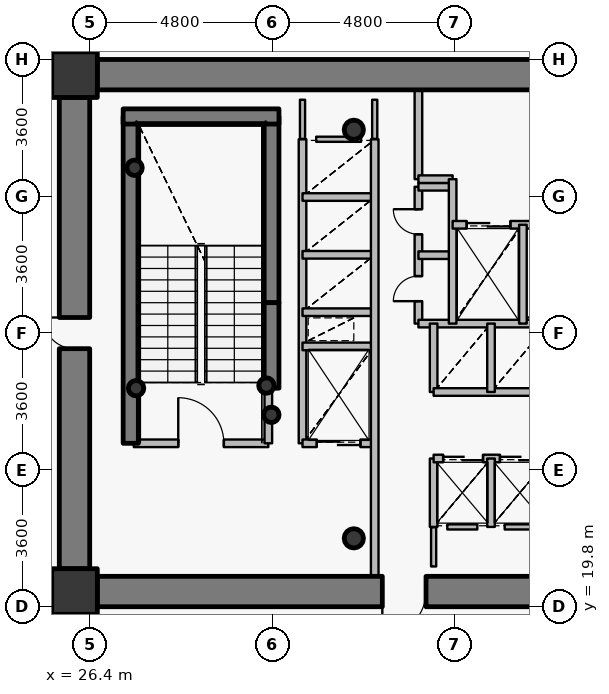
"""IFC4 building model, lengths in metres.
Left out: names, types, materials, properties, quantities, classifications, styles, units other than length and angle.
Written with IfcOpenShell. Run it as: python <this file> out.ifc"""

import sys

from ifc_helpers import new_model, si_unit, direction, frame, frame_2d, origin, origin_2d, place, context, subcontext, project, spatial, rectangle, hollow_circle, extrude, source, transform, mapped, element, fill, save


model = new_model("IFC4")
c1 = context("Model", 3, precision=1e-05, world=origin(), true_north=direction((0.0, 1.0)))
c2 = subcontext(c1, "Body", "Model", "MODEL_VIEW")
j1 = project(units=[si_unit("LENGTHUNIT", "METRE"), si_unit("PLANEANGLEUNIT", "RADIAN")], contexts=[c1])
p1 = place(None, origin())
s1 = spatial("IfcSite", under=j1, at=p1, CompositionType="ELEMENT")
p2 = place(p1, origin())
s2 = spatial("IfcBuilding", under=s1, at=p2, CompositionType="ELEMENT")
p3 = place(p2, frame((0.0, 0.0, 130.95)))
s3 = spatial("IfcBuildingStorey", under=s2, at=p3, CompositionType="ELEMENT", Elevation=130.95)
for number, where, z_axis, x_axis in (
    (1, (26.0, 20.2, 0.0), (0.0, 0.0, 1.0), (1.0, 0.0, 0.0)),
    (2, (26.0, 33.8, 0.0), (0.0, 0.0, 1.0), (1.0, 0.0, 0.0)),
):
    element("IfcColumn", number, at=place(p3, frame(where, z_axis=z_axis, x_axis=x_axis)), inside=s3, PredefinedType="COLUMN", context=c2, shape_type="SweptSolid", body=[
        extrude(rectangle(XDim=1.2, YDim=1.2, at=origin_2d()), origin(), (0.0, 0.0, 1.0), 3.75),
    ])
for number, where, z_axis, x_axis in (
    (3, (33.35, 21.6, 0.0), (0.0, 0.0, 1.0), (1.0, 0.0, 0.0)),
    (4, (33.35, 32.35, 0.0), (0.0, 0.0, 1.0), (1.0, 0.0, 0.0)),
):
    element("IfcColumn", number, at=place(p3, frame(where, z_axis=z_axis, x_axis=x_axis)), inside=s3, PredefinedType="COLUMN", context=c2, shape_type="SweptSolid", body=[
        extrude(hollow_circle(Radius=0.254, WallThickness=0.02, at=origin_2d()), origin(), (0.0, 0.0, 1.0), 3.75),
    ])
p4 = place(p3, frame((27.48, 24.1, 0.0), z_axis=(0.0, 0.0, 1.0), x_axis=(0.0, 1.0, 0.0)))
e5 = element("IfcWall", 5, at=p4, inside=s3, PredefinedType="SHEAR", context=c2, shape_type="SweptSolid", body=[
    extrude(rectangle(XDim=8.6, YDim=0.4, at=frame_2d((4.3, 0.0))), origin(), (0.0, 0.0, 1.0), 3.75),
])
p5 = place(p3, frame((31.18, 27.8, 0.0), z_axis=(0.0, 0.0, 1.0), x_axis=(0.0, 1.0, 0.0)))
e6 = element("IfcWall", 6, at=p5, inside=s3, PredefinedType="SHEAR", context=c2, shape_type="SweptSolid", body=[
    extrude(rectangle(XDim=4.9, YDim=0.4, at=frame_2d((2.45, 0.0))), origin(), (0.0, 0.0, 1.0), 3.75),
])
p6 = place(p3, frame((27.28, 32.7, 0.0), z_axis=(0.0, 0.0, 1.0), x_axis=(1.0, 0.0, 0.0)))
e7 = element("IfcWall", 7, at=p6, inside=s3, PredefinedType="SHEAR", context=c2, shape_type="SweptSolid", body=[
    extrude(rectangle(XDim=4.1, YDim=0.4, at=frame_2d((2.05, 0.0))), origin(), (0.0, 0.0, 1.0), 3.75),
])
for number, where, z_axis, x_axis in (
    (8, (27.58, 31.35, 0.0), (0.0, 0.0, 1.0), (1.0, 0.0, 0.0)),
    (9, (31.05, 25.62, 0.0), (0.0, 0.0, 1.0), (1.0, 0.0, 0.0)),
    (10, (31.18, 24.85, 0.0), (0.0, 0.0, 1.0), (1.0, 0.0, 0.0)),
    (11, (27.62, 25.55, 0.0), (0.0, 0.0, 1.0), (1.0, 0.0, 0.0)),
):
    element("IfcColumn", number, at=place(p3, frame(where, z_axis=z_axis, x_axis=x_axis)), inside=s3, PredefinedType="COLUMN", context=c2, shape_type="SweptSolid", body=[
        extrude(hollow_circle(Radius=0.203, WallThickness=0.016, at=origin_2d()), origin(), (0.0, 0.0, 1.0), 3.75),
    ])
p7 = place(p3, frame((26.6, 33.8, 0.0), z_axis=(0.0, 0.0, 1.0), x_axis=(1.0, 0.0, 0.0)))
e12 = element("IfcWall", 12, at=p7, inside=s3, PredefinedType="SHEAR", context=c2, shape_type="SweptSolid", body=[
    extrude(rectangle(XDim=18.8, YDim=0.8, at=frame_2d((9.4, 0.0))), origin(), (0.0, 0.0, 1.0), 2.95),
])
p8 = place(p3, frame((45.4, 20.2, 0.0), z_axis=(0.0, 0.0, 1.0), x_axis=(-1.0, 0.0, 0.0)))
e13 = element("IfcWall", 13, at=p8, inside=s3, PredefinedType="SHEAR", context=c2, shape_type="SweptSolid", body=[
    extrude(rectangle(XDim=18.8, YDim=0.8, at=frame_2d((9.4, 0.0))), origin(), (0.0, 0.0, 1.0), 2.95),
])
p9 = place(p8, frame((10.15, 0.0, 0.0)))
e14 = element("IfcOpeningElement", 14, at=p9, cuts=e13, PredefinedType="OPENING", context=c2, shape_type="SweptSolid", body=[
    extrude(rectangle(XDim=1.15, YDim=2.15, at=origin_2d()), frame((0.575, 0.41, 1.075), z_axis=(0.0, -1.0, 0.0), x_axis=(1.0, 0.0, 0.0)), (0.0, 0.0, 1.0), 0.82),
])
p10 = place(p3, frame((26.0, 20.8, 0.0), z_axis=(0.0, 0.0, 1.0), x_axis=(0.0, 1.0, 0.0)))
e15 = element("IfcWall", 15, at=p10, inside=s3, PredefinedType="SHEAR", context=c2, shape_type="SweptSolid", body=[
    extrude(rectangle(XDim=12.4, YDim=0.8, at=frame_2d((6.2, 0.0))), origin(), (0.0, 0.0, 1.0), 2.95),
])
p11 = place(p10, frame((5.79, 0.0, 0.0)))
e16 = element("IfcOpeningElement", 16, at=p11, cuts=e15, PredefinedType="OPENING", context=c2, shape_type="SweptSolid", body=[
    extrude(rectangle(XDim=0.82, YDim=2.1, at=origin_2d()), frame((0.41, 0.41, 1.05), z_axis=(0.0, -1.0, 0.0), x_axis=(1.0, 0.0, 0.0)), (0.0, 0.0, 1.0), 0.82),
])
p12 = place(p3, frame((31.18, 25.55, 0.0), z_axis=(0.0, 0.0, 1.0), x_axis=(0.0, 1.0, 0.0)))
e17 = element("IfcWall", 17, at=p12, inside=s3, PredefinedType="SHEAR", context=c2, shape_type="SweptSolid", body=[
    extrude(rectangle(XDim=2.25, YDim=0.4, at=frame_2d((1.125, 0.0))), origin(), (0.0, 0.0, 1.0), 3.1),
])
p13 = place(p3, frame((27.56, 24.1, 0.0), z_axis=(0.0, 0.0, 1.0), x_axis=(1.0, 0.0, 0.0)))
e18 = element("IfcWall", 18, at=p13, inside=s3, PredefinedType="PARTITIONING", context=c2, shape_type="SweptSolid", body=[
    extrude(rectangle(XDim=3.54, YDim=0.2, at=frame_2d((1.77, 0.0))), origin(), (0.0, 0.0, 1.0), 3.5),
])
p14 = place(p13, frame((1.17, 0.0, 0.0)))
e19 = element("IfcOpeningElement", 19, at=p14, cuts=e18, PredefinedType="OPENING", context=c2, shape_type="SweptSolid", body=[
    extrude(rectangle(XDim=1.2, YDim=2.15, at=origin_2d()), frame((0.6, 0.11, 1.075), z_axis=(0.0, -1.0, 0.0), x_axis=(1.0, 0.0, 0.0)), (0.0, 0.0, 1.0), 0.22),
])
p15 = place(p3, frame((31.1, 24.1, 0.0), z_axis=(0.0, 0.0, 1.0), x_axis=(0.0, 1.0, 0.0)))
e20 = element("IfcWall", 20, at=p15, inside=s3, PredefinedType="PARTITIONING", context=c2, shape_type="SweptSolid", body=[
    extrude(rectangle(XDim=1.44, YDim=0.2, at=frame_2d((0.72, 0.0))), origin(), (0.0, 0.0, 1.0), 3.5),
])
p16 = place(p3, frame((32.0, 24.1, 0.0), z_axis=(0.0, 0.0, 1.0), x_axis=(0.0, 1.0, 0.0)))
e21 = element("IfcWall", 21, at=p16, inside=s3, PredefinedType="PARTITIONING", context=c2, shape_type="SweptSolid", body=[
    extrude(rectangle(XDim=8.0, YDim=0.2, at=frame_2d((4.0, 0.0))), origin(), (0.0, 0.0, 1.0), 3.5),
])
p17 = place(p3, frame((32.0, 24.1, 0.0), z_axis=(0.0, 0.0, 1.0), x_axis=(1.0, 0.0, 0.0)))
e22 = element("IfcWall", 22, at=p17, inside=s3, PredefinedType="PARTITIONING", context=c2, shape_type="SweptSolid", body=[
    extrude(rectangle(XDim=1.9, YDim=0.2, at=frame_2d((0.95, 0.0))), origin(), (0.0, 0.0, 1.0), 3.085),
])
p18 = place(p17, frame((0.375, 0.0, 0.0)))
e23 = element("IfcOpeningElement", 23, at=p18, cuts=e22, PredefinedType="OPENING", context=c2, shape_type="SweptSolid", body=[
    extrude(rectangle(XDim=1.15, YDim=2.15, at=origin_2d()), frame((0.575, 0.11, 1.075), z_axis=(0.0, -1.0, 0.0), x_axis=(1.0, 0.0, 0.0)), (0.0, 0.0, 1.0), 0.22),
])
for number, where, z_axis, x_axis in (
    (24, (32.0, 26.65, 0.0), (0.0, 0.0, 1.0), (1.0, 0.0, 0.0)),
    (25, (32.0, 27.55, 0.0), (0.0, 0.0, 1.0), (1.0, 0.0, 0.0)),
    (26, (32.0, 29.06, 0.0), (0.0, 0.0, 1.0), (1.0, 0.0, 0.0)),
    (27, (32.0, 30.58, 0.0), (0.0, 0.0, 1.0), (1.0, 0.0, 0.0)),
):
    element("IfcWall", number, at=place(p3, frame(where, z_axis=z_axis, x_axis=x_axis)), inside=s3, PredefinedType="PARTITIONING", context=c2, shape_type="SweptSolid", body=[
        extrude(rectangle(XDim=1.9, YDim=0.2, at=frame_2d((0.95, 0.0))), origin(), (0.0, 0.0, 1.0), 3.085),
    ])
p19 = place(p3, frame((33.9, 20.6, 0.0), z_axis=(0.0, 0.0, 1.0), x_axis=(0.0, 1.0, 0.0)))
e28 = element("IfcWall", 28, at=p19, inside=s3, PredefinedType="PARTITIONING", context=c2, shape_type="SweptSolid", body=[
    extrude(rectangle(XDim=11.5, YDim=0.2, at=frame_2d((5.75, 0.0))), origin(), (0.0, 0.0, 1.0), 3.085),
])
p20 = place(p3, frame((35.05, 27.25, 0.0), z_axis=(0.0, 0.0, 1.0), x_axis=(0.0, 1.0, 0.0)))
e29 = element("IfcWall", 29, at=p20, inside=s3, PredefinedType="PARTITIONING", context=c2, shape_type="SweptSolid", body=[
    extrude(rectangle(XDim=3.6, YDim=0.2, at=frame_2d((1.8, 0.0))), origin(), (0.0, 0.0, 1.0), 3.5),
])
p21 = place(p20, frame((0.59, 0.0, 0.0)))
e30 = element("IfcOpeningElement", 30, at=p21, cuts=e29, PredefinedType="OPENING", context=c2, shape_type="SweptSolid", body=[
    extrude(rectangle(XDim=0.66, YDim=2.05, at=origin_2d()), frame((0.33, 0.11, 1.025), z_axis=(0.0, -1.0, 0.0), x_axis=(1.0, 0.0, 0.0)), (0.0, 0.0, 1.0), 0.22),
])
p22 = place(p20, frame((2.35, 0.0, 0.0)))
e31 = element("IfcOpeningElement", 31, at=p22, cuts=e29, PredefinedType="OPENING", context=c2, shape_type="SweptSolid", body=[
    extrude(rectangle(XDim=0.66, YDim=2.05, at=origin_2d()), frame((0.33, 0.11, 1.025), z_axis=(0.0, -1.0, 0.0), x_axis=(1.0, 0.0, 0.0)), (0.0, 0.0, 1.0), 0.22),
])
p23 = place(p3, frame((35.05, 27.25, 0.0), z_axis=(0.0, 0.0, 1.0), x_axis=(1.0, 0.0, 0.0)))
e32 = element("IfcWall", 32, at=p23, inside=s3, PredefinedType="PARTITIONING", context=c2, shape_type="SweptSolid", body=[
    extrude(rectangle(XDim=4.95, YDim=0.2, at=frame_2d((2.475, 0.0))), origin(), (0.0, 0.0, 1.0), 3.085),
])
for number, where, z_axis, x_axis in (
    (33, (35.05, 29.05, 0.0), (0.0, 0.0, 1.0), (1.0, 0.0, 0.0)),
    (34, (35.05, 30.85, 0.0), (0.0, 0.0, 1.0), (1.0, 0.0, 0.0)),
):
    element("IfcWall", number, at=place(p3, frame(where, z_axis=z_axis, x_axis=x_axis)), inside=s3, PredefinedType="PARTITIONING", context=c2, shape_type="SweptSolid", body=[
        extrude(rectangle(XDim=0.9, YDim=0.2, at=frame_2d((0.45, 0.0))), origin(), (0.0, 0.0, 1.0), 3.5),
    ])
p24 = place(p3, frame((35.05, 31.05, 0.0), z_axis=(0.0, 0.0, 1.0), x_axis=(0.0, 1.0, 0.0)))
e35 = element("IfcWall", 35, at=p24, inside=s3, PredefinedType="PARTITIONING", context=c2, shape_type="SweptSolid", body=[
    extrude(rectangle(XDim=2.35, YDim=0.2, at=frame_2d((1.175, 0.0))), origin(), (0.0, 0.0, 1.0), 3.085),
])
p25 = place(p3, frame((35.05, 31.05, 0.0), z_axis=(0.0, 0.0, 1.0), x_axis=(1.0, 0.0, 0.0)))
e36 = element("IfcWall", 36, at=p25, inside=s3, PredefinedType="PARTITIONING", context=c2, shape_type="SweptSolid", body=[
    extrude(rectangle(XDim=0.9, YDim=0.2, at=frame_2d((0.45, 0.0))), origin(), (0.0, 0.0, 1.0), 3.5),
])
p26 = place(p3, frame((35.45, 21.9, 0.0), z_axis=(0.0, 0.0, 1.0), x_axis=(0.0, 1.0, 0.0)))
e37 = element("IfcWall", 37, at=p26, inside=s3, PredefinedType="PARTITIONING", context=c2, shape_type="SweptSolid", body=[
    extrude(rectangle(XDim=1.8, YDim=0.2, at=frame_2d((0.9, 0.0))), origin(), (0.0, 0.0, 1.0), 3.5),
])
p27 = place(p3, frame((35.45, 23.7, 0.0), z_axis=(0.0, 0.0, 1.0), x_axis=(1.0, 0.0, 0.0)))
e38 = element("IfcWall", 38, at=p27, inside=s3, PredefinedType="PARTITIONING", context=c2, shape_type="SweptSolid", body=[
    extrude(rectangle(XDim=4.55, YDim=0.2, at=frame_2d((2.275, 0.0))), origin(), (0.0, 0.0, 1.0), 3.085),
])
p28 = place(p27, frame((0.25, 0.0, 0.0)))
e39 = element("IfcOpeningElement", 39, at=p28, cuts=e38, PredefinedType="OPENING", context=c2, shape_type="SweptSolid", body=[
    extrude(rectangle(XDim=1.05, YDim=2.15, at=origin_2d()), frame((0.525, 0.11, 1.075), z_axis=(0.0, -1.0, 0.0), x_axis=(1.0, 0.0, 0.0)), (0.0, 0.0, 1.0), 0.22),
])
p29 = place(p27, frame((1.745, 0.0, 0.0)))
e40 = element("IfcOpeningElement", 40, at=p29, cuts=e38, PredefinedType="OPENING", context=c2, shape_type="SweptSolid", body=[
    extrude(rectangle(XDim=1.05, YDim=2.15, at=origin_2d()), frame((0.525, 0.11, 1.075), z_axis=(0.0, -1.0, 0.0), x_axis=(1.0, 0.0, 0.0)), (0.0, 0.0, 1.0), 0.22),
])
p30 = place(p27, frame((3.165, 0.0, 0.0)))
e41 = element("IfcOpeningElement", 41, at=p30, cuts=e38, PredefinedType="OPENING", context=c2, shape_type="SweptSolid", body=[
    extrude(rectangle(XDim=1.05, YDim=2.15, at=origin_2d()), frame((0.525, 0.11, 1.075), z_axis=(0.0, -1.0, 0.0), x_axis=(1.0, 0.0, 0.0)), (0.0, 0.0, 1.0), 0.22),
])
p31 = place(p3, frame((35.45, 25.45, 0.0), z_axis=(0.0, 0.0, 1.0), x_axis=(0.0, 1.0, 0.0)))
e42 = element("IfcWall", 42, at=p31, inside=s3, PredefinedType="PARTITIONING", context=c2, shape_type="SweptSolid", body=[
    extrude(rectangle(XDim=1.8, YDim=0.2, at=frame_2d((0.9, 0.0))), origin(), (0.0, 0.0, 1.0), 3.5),
])
p32 = place(p3, frame((35.45, 25.45, 0.0), z_axis=(0.0, 0.0, 1.0), x_axis=(1.0, 0.0, 0.0)))
e43 = element("IfcWall", 43, at=p32, inside=s3, PredefinedType="PARTITIONING", context=c2, shape_type="SweptSolid", body=[
    extrude(rectangle(XDim=4.55, YDim=0.2, at=frame_2d((2.275, 0.0))), origin(), (0.0, 0.0, 1.0), 3.085),
])
p33 = place(p3, frame((35.95, 27.25, 0.0), z_axis=(0.0, 0.0, 1.0), x_axis=(0.0, 1.0, 0.0)))
e44 = element("IfcWall", 44, at=p33, inside=s3, PredefinedType="PARTITIONING", context=c2, shape_type="SweptSolid", body=[
    extrude(rectangle(XDim=3.8, YDim=0.2, at=frame_2d((1.9, 0.0))), origin(), (0.0, 0.0, 1.0), 3.5),
])
p34 = place(p3, frame((35.95, 29.85, 0.0), z_axis=(0.0, 0.0, 1.0), x_axis=(1.0, 0.0, 0.0)))
e45 = element("IfcWall", 45, at=p34, inside=s3, PredefinedType="PARTITIONING", context=c2, shape_type="SweptSolid", body=[
    extrude(rectangle(XDim=8.49, YDim=0.2, at=frame_2d((4.245, 0.0))), origin(), (0.0, 0.0, 1.0), 3.085),
])
p35 = place(p34, frame((6.1, 0.0, 0.0)))
e46 = element("IfcOpeningElement", 46, at=p35, cuts=e45, PredefinedType="OPENING", context=c2, shape_type="SweptSolid", body=[
    extrude(rectangle(XDim=1.2, YDim=2.15, at=origin_2d()), frame((0.6, 0.11, 1.075), z_axis=(0.0, -1.0, 0.0), x_axis=(1.0, 0.0, 0.0)), (0.0, 0.0, 1.0), 0.22),
])
p36 = place(p34, frame((0.37, 0.0, 0.0)))
e47 = element("IfcOpeningElement", 47, at=p36, cuts=e45, PredefinedType="OPENING", context=c2, shape_type="SweptSolid", body=[
    extrude(rectangle(XDim=1.15, YDim=2.15, at=origin_2d()), frame((0.575, 0.11, 1.075), z_axis=(0.0, -1.0, 0.0), x_axis=(1.0, 0.0, 0.0)), (0.0, 0.0, 1.0), 0.22),
])
p37 = place(p34, frame((2.425, 0.0, 0.0)))
e48 = element("IfcOpeningElement", 48, at=p37, cuts=e45, PredefinedType="OPENING", context=c2, shape_type="SweptSolid", body=[
    extrude(rectangle(XDim=1.05, YDim=2.15, at=origin_2d()), frame((0.525, 0.11, 1.075), z_axis=(0.0, -1.0, 0.0), x_axis=(1.0, 0.0, 0.0)), (0.0, 0.0, 1.0), 0.22),
])
for number, where, z_axis, x_axis in (
    (49, (36.96, 21.9, 0.0), (0.0, 0.0, 1.0), (0.0, 1.0, 0.0)),
    (50, (36.96, 25.45, 0.0), (0.0, 0.0, 1.0), (0.0, 1.0, 0.0)),
):
    element("IfcWall", number, at=place(p3, frame(where, z_axis=z_axis, x_axis=x_axis)), inside=s3, PredefinedType="PARTITIONING", context=c2, shape_type="SweptSolid", body=[
        extrude(rectangle(XDim=1.8, YDim=0.2, at=frame_2d((0.9, 0.0))), origin(), (0.0, 0.0, 1.0), 3.5),
    ])
p38 = place(p3, frame((37.8, 27.25, 0.0), z_axis=(0.0, 0.0, 1.0), x_axis=(0.0, 1.0, 0.0)))
e51 = element("IfcWall", 51, at=p38, inside=s3, PredefinedType="PARTITIONING", context=c2, shape_type="SweptSolid", body=[
    extrude(rectangle(XDim=2.6, YDim=0.2, at=frame_2d((1.3, 0.0))), origin(), (0.0, 0.0, 1.0), 3.5),
])
p39 = place(p3, frame((36.6, 21.9, 0.0), z_axis=(0.0, 0.0, 1.0), x_axis=(-1.0, 0.0, 0.0)))
e52 = element("IfcWall", 52, at=p39, inside=s3, PredefinedType="PARTITIONING", context=c2, shape_type="SweptSolid", body=[
    extrude(rectangle(XDim=0.79, YDim=0.135, at=frame_2d((0.395, 0.0))), origin(), (0.0, 0.0, 1.0), 3.5),
])
p40 = place(p3, frame((38.12, 21.9, 0.0), z_axis=(0.0, 0.0, 1.0), x_axis=(-1.0, 0.0, 0.0)))
e53 = element("IfcWall", 53, at=p40, inside=s3, PredefinedType="PARTITIONING", context=c2, shape_type="SweptSolid", body=[
    extrude(rectangle(XDim=0.8, YDim=0.135, at=frame_2d((0.4, 0.0))), origin(), (0.0, 0.0, 1.0), 3.5),
])
p41 = place(p3, frame((32.36, 32.1, 0.0), z_axis=(0.0, 0.0, 1.0), x_axis=(1.0, 0.0, 0.0)))
e54 = element("IfcWall", 54, at=p41, inside=s3, PredefinedType="PARTITIONING", context=c2, shape_type="SweptSolid", body=[
    extrude(rectangle(XDim=1.18, YDim=0.135, at=frame_2d((0.59, 0.0))), origin(), (0.0, 0.0, 1.0), 3.085),
])
p42 = place(p3, frame((32.0, 33.14, 0.0), z_axis=(0.0, 0.0, 1.0), x_axis=(0.0, -1.0, 0.0)))
e55 = element("IfcWall", 55, at=p42, inside=s3, PredefinedType="PARTITIONING", context=c2, shape_type="SweptSolid", body=[
    extrude(rectangle(XDim=1.03, YDim=0.135, at=frame_2d((0.515, 0.0))), origin(), (0.0, 0.0, 1.0), 3.035),
])
for number, where, z_axis, x_axis in (
    (56, (35.45, 21.89, 0.0), (0.0, 0.0, 1.0), (0.0, -1.0, 0.0)),
    (57, (33.9, 32.11, 0.0), (0.0, 0.0, 1.0), (0.0, 1.0, 0.0)),
):
    element("IfcWall", number, at=place(p3, frame(where, z_axis=z_axis, x_axis=x_axis)), inside=s3, PredefinedType="PARTITIONING", context=c2, shape_type="SweptSolid", body=[
        extrude(rectangle(XDim=1.03, YDim=0.135, at=frame_2d((0.515, 0.0))), origin(), (0.0, 0.0, 1.0), 3.085),
    ])
p43 = place(p3, frame((26.59, 34.2, 0.0), z_axis=(0.0, 0.0, 1.0), x_axis=(-1.0, 0.0, 0.0)))
e58 = element("IfcWall", 58, at=p43, inside=s3, PredefinedType="PARTITIONING", context=c2, shape_type="SweptSolid", body=[
    extrude(rectangle(XDim=0.99, YDim=0.135, at=frame_2d((0.495, 0.0))), origin(), (0.0, 0.0, 1.0), 2.935),
])
p44 = place(p3, frame((25.6, 33.893, 0.0), z_axis=(0.0, 0.0, 1.0), x_axis=(0.0, -1.0, 0.0)))
e59 = element("IfcWall", 59, at=p44, inside=s3, PredefinedType="PARTITIONING", context=c2, shape_type="SweptSolid", body=[
    extrude(rectangle(XDim=0.683, YDim=0.135, at=frame_2d((0.341, 0.0))), origin(), (0.0, 0.0, 1.0), 3.5),
])
p45 = place(p3, frame((25.6, 20.79, 0.0), z_axis=(0.0, 0.0, 1.0), x_axis=(0.0, -1.0, 0.0)))
e60 = element("IfcWall", 60, at=p45, inside=s3, PredefinedType="PARTITIONING", context=c2, shape_type="SweptSolid", body=[
    extrude(rectangle(XDim=0.99, YDim=0.135, at=frame_2d((0.495, 0.0))), origin(), (0.0, 0.0, 1.0), 3.5),
])
p46 = place(p3, frame((25.907, 19.8, 0.0), z_axis=(0.0, 0.0, 1.0), x_axis=(1.0, 0.0, 0.0)))
e61 = element("IfcWall", 61, at=p46, inside=s3, PredefinedType="PARTITIONING", context=c2, shape_type="SweptSolid", body=[
    extrude(rectangle(XDim=0.683, YDim=0.135, at=frame_2d((0.341, 0.0))), origin(), (0.0, 0.0, 1.0), 2.935),
])
m1 = source(origin(), c2, "Body", "SweptSolid", [
    extrude(rectangle(XDim=0.82, YDim=2.1, at=origin_2d()), frame((0.41, 0.025, 1.05), z_axis=(0.0, -1.0, 0.0), x_axis=(1.0, 0.0, 0.0)), (0.0, 0.0, 1.0), 0.05),
])
p47 = place(p11, origin())
e62 = element("IfcDoor", 62, at=p47, inside=s3, OperationType="SINGLE_SWING_RIGHT", PredefinedType="DOOR", context=c2, shape_type="MappedRepresentation", body=[
    mapped(m1, transform((0.0, 0.0, 0.0), x_axis=(1.0, 0.0, 0.0), y_axis=(0.0, 1.0, 0.0), z_axis=(0.0, 0.0, 1.0), scale=1.0)),
])
fill(e16, e62)
m2 = source(origin(), c2, "Body", "SweptSolid", [
    extrude(rectangle(XDim=1.15, YDim=2.15, at=origin_2d()), frame((0.575, 0.025, 1.075), z_axis=(0.0, -1.0, 0.0), x_axis=(1.0, 0.0, 0.0)), (0.0, 0.0, 1.0), 0.05),
])
p48 = place(p9, origin())
e63 = element("IfcDoor", 63, at=p48, inside=s3, OperationType="SINGLE_SWING_RIGHT", PredefinedType="DOOR", context=c2, shape_type="MappedRepresentation", body=[
    mapped(m2, transform((0.0, 0.0, 0.0), x_axis=(1.0, 0.0, 0.0), y_axis=(0.0, 1.0, 0.0), z_axis=(0.0, 0.0, 1.0), scale=1.0)),
])
fill(e14, e63)
m3 = source(origin(), c2, "Body", "SweptSolid", [
    extrude(rectangle(XDim=1.2, YDim=2.15, at=origin_2d()), frame((0.6, 0.025, 1.075), z_axis=(0.0, -1.0, 0.0), x_axis=(1.0, 0.0, 0.0)), (0.0, 0.0, 1.0), 0.05),
])
p49 = place(p14, origin())
e64 = element("IfcDoor", 64, at=p49, inside=s3, OperationType="SINGLE_SWING_LEFT", PredefinedType="DOOR", context=c2, shape_type="MappedRepresentation", body=[
    mapped(m3, transform((0.0, 0.0, 0.0), x_axis=(1.0, 0.0, 0.0), y_axis=(0.0, 1.0, 0.0), z_axis=(0.0, 0.0, 1.0), scale=1.0)),
])
fill(e19, e64)
m4 = source(origin(), c2, "Body", "SweptSolid", [
    extrude(rectangle(XDim=1.15, YDim=2.15, at=origin_2d()), frame((0.575, 0.025, 1.075), z_axis=(0.0, -1.0, 0.0), x_axis=(1.0, 0.0, 0.0)), (0.0, 0.0, 1.0), 0.05),
])
p50 = place(p36, origin())
e65 = element("IfcDoor", 65, at=p50, inside=s3, OperationType="DOUBLE_DOOR_SLIDING", PredefinedType="USERDEFINED", context=c2, shape_type="MappedRepresentation", body=[
    mapped(m4, transform((0.0, 0.0, 0.0), x_axis=(1.0, 0.0, 0.0), y_axis=(0.0, 1.0, 0.0), z_axis=(0.0, 0.0, 1.0), scale=1.0)),
])
fill(e47, e65)
p51 = place(p18, origin())
e66 = element("IfcDoor", 66, at=p51, inside=s3, OperationType="DOUBLE_DOOR_SLIDING", PredefinedType="USERDEFINED", context=c2, shape_type="MappedRepresentation", body=[
    mapped(m4, transform((0.0, 0.0, 0.0), x_axis=(1.0, 0.0, 0.0), y_axis=(0.0, 1.0, 0.0), z_axis=(0.0, 0.0, 1.0), scale=1.0)),
])
fill(e23, e66)
m5 = source(origin(), c2, "Body", "SweptSolid", [
    extrude(rectangle(XDim=1.05, YDim=2.15, at=origin_2d()), frame((0.525, 0.025, 1.075), z_axis=(0.0, -1.0, 0.0), x_axis=(1.0, 0.0, 0.0)), (0.0, 0.0, 1.0), 0.05),
])
p52 = place(p28, origin())
e67 = element("IfcDoor", 67, at=p52, inside=s3, OperationType="DOUBLE_DOOR_SLIDING", PredefinedType="USERDEFINED", context=c2, shape_type="MappedRepresentation", body=[
    mapped(m5, transform((0.0, 0.0, 0.0), x_axis=(1.0, 0.0, 0.0), y_axis=(0.0, 1.0, 0.0), z_axis=(0.0, 0.0, 1.0), scale=1.0)),
])
fill(e39, e67)
p53 = place(p29, origin())
e68 = element("IfcDoor", 68, at=p53, inside=s3, OperationType="DOUBLE_DOOR_SLIDING", PredefinedType="USERDEFINED", context=c2, shape_type="MappedRepresentation", body=[
    mapped(m5, transform((0.0, 0.0, 0.0), x_axis=(1.0, 0.0, 0.0), y_axis=(0.0, 1.0, 0.0), z_axis=(0.0, 0.0, 1.0), scale=1.0)),
])
fill(e40, e68)
m6 = source(origin(), c2, "Body", "SweptSolid", [
    extrude(rectangle(XDim=0.66, YDim=2.05, at=origin_2d()), frame((0.33, 0.025, 1.025), z_axis=(0.0, -1.0, 0.0), x_axis=(1.0, 0.0, 0.0)), (0.0, 0.0, 1.0), 0.05),
])
p54 = place(p21, origin())
e69 = element("IfcDoor", 69, at=p54, inside=s3, OperationType="SINGLE_SWING_LEFT", PredefinedType="USERDEFINED", context=c2, shape_type="MappedRepresentation", body=[
    mapped(m6, transform((0.0, 0.0, 0.0), x_axis=(1.0, 0.0, 0.0), y_axis=(0.0, 1.0, 0.0), z_axis=(0.0, 0.0, 1.0), scale=1.0)),
])
fill(e30, e69)
p55 = place(p22, origin())
e70 = element("IfcDoor", 70, at=p55, inside=s3, OperationType="SINGLE_SWING_RIGHT", PredefinedType="USERDEFINED", context=c2, shape_type="MappedRepresentation", body=[
    mapped(m6, transform((0.0, 0.0, 0.0), x_axis=(1.0, 0.0, 0.0), y_axis=(0.0, 1.0, 0.0), z_axis=(0.0, 0.0, 1.0), scale=1.0)),
])
fill(e31, e70)
save(model, sys.argv[1])
